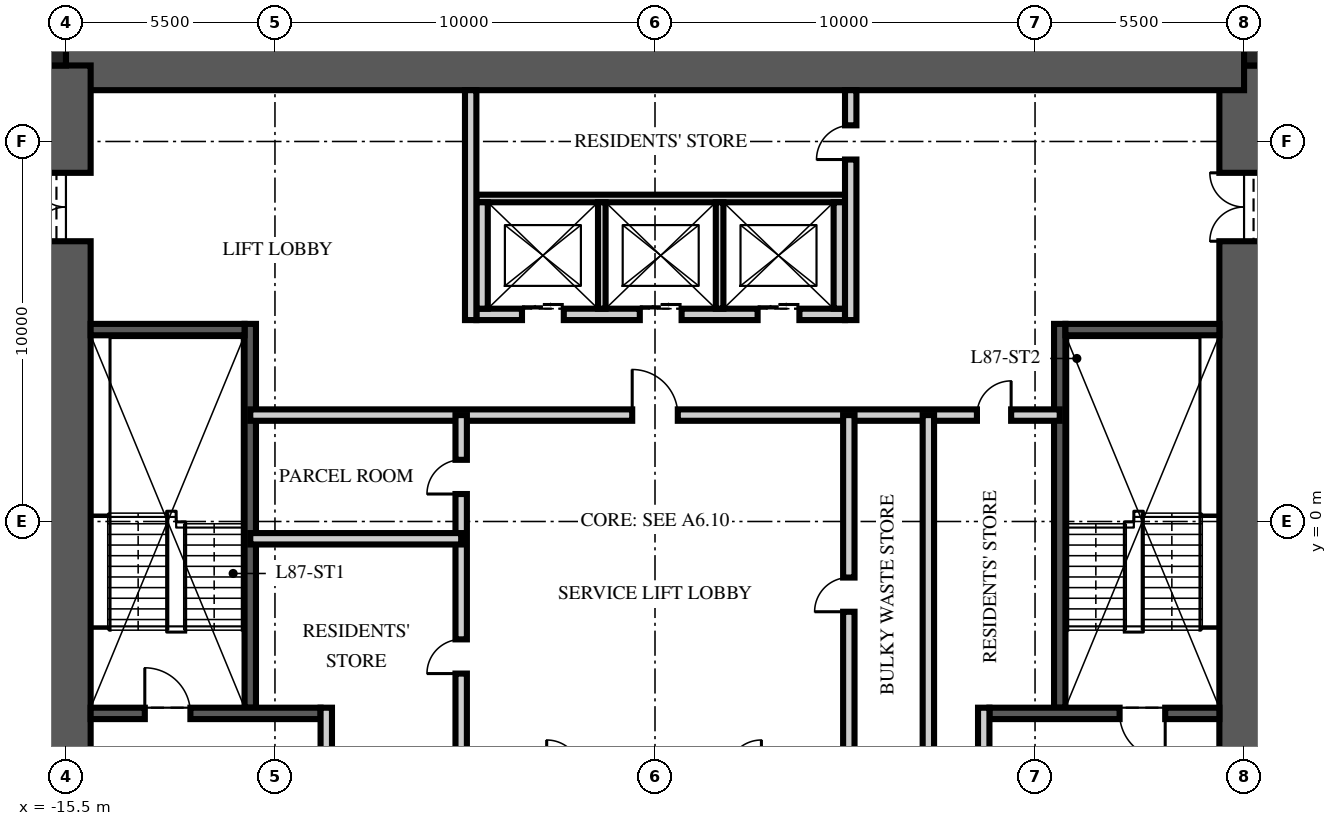
"""IFC4 building model, lengths in metres.
Left out: names, types, materials, properties, quantities, classifications, styles, units other than length and angle.
Written with IfcOpenShell. Run it as: python <this file> out.ifc"""

import sys

from ifc_helpers import new_model, si_unit, direction, frame, frame_2d, origin, origin_2d, place, context, subcontext, project, spatial, rectangle, extrude, element, fill, save


model = new_model("IFC4")
c1 = context("Model", 3, precision=1e-05, world=origin(), true_north=direction((0.0, 1.0)))
c2 = subcontext(c1, "Body", "Model", "MODEL_VIEW")
j1 = project(units=[si_unit("LENGTHUNIT", "METRE"), si_unit("PLANEANGLEUNIT", "RADIAN")], contexts=[c1])
p1 = place(None, origin())
s1 = spatial("IfcSite", under=j1, at=p1, CompositionType="ELEMENT")
p2 = place(p1, origin())
s2 = spatial("IfcBuilding", under=s1, at=p2, CompositionType="ELEMENT")
p3 = place(p2, frame((0.0, 0.0, 345.75)))
s3 = spatial("IfcBuildingStorey", under=s2, at=p3, CompositionType="ELEMENT", Elevation=345.75)
p4 = place(p3, frame((15.5, -12.0, -0.25), z_axis=(0.0, 0.0, 1.0), x_axis=(0.0, 1.0, 0.0)))
e1 = element("IfcWall", 1, at=p4, inside=s3, PredefinedType="SHEAR", context=c2, shape_type="SweptSolid", body=[
    extrude(rectangle(XDim=24.0, YDim=1.3, at=frame_2d((12.0, 0.0))), origin(), (0.0, 0.0, 1.0), 3.75),
])
p5 = place(p4, frame((3.125, 0.0, 0.25)))
e2 = element("IfcOpeningElement", 2, at=p5, cuts=e1, PredefinedType="OPENING", context=c2, shape_type="SweptSolid", body=[
    extrude(rectangle(XDim=1.2, YDim=2.1, at=frame_2d((0.6, 1.05))), frame((0.0, 0.66, 0.0), z_axis=(0.0, -1.0, 0.0), x_axis=(1.0, 0.0, 0.0)), (0.0, 0.0, 1.0), 1.32),
])
p6 = place(p4, frame((19.375, 0.0, 0.25)))
e3 = element("IfcOpeningElement", 3, at=p6, cuts=e1, PredefinedType="OPENING", context=c2, shape_type="SweptSolid", body=[
    extrude(rectangle(XDim=1.8, YDim=2.1, at=frame_2d((0.9, 1.05))), frame((0.0, 0.66, 0.0), z_axis=(0.0, -1.0, 0.0), x_axis=(1.0, 0.0, 0.0)), (0.0, 0.0, 1.0), 1.32),
])
p7 = place(p3, frame((-15.5, 12.0, -0.25), z_axis=(0.0, 0.0, 1.0), x_axis=(1.0, 0.0, 0.0)))
e4 = element("IfcWall", 4, at=p7, inside=s3, PredefinedType="SHEAR", context=c2, shape_type="SweptSolid", body=[
    extrude(rectangle(XDim=31.0, YDim=1.3, at=frame_2d((15.5, 0.0))), origin(), (0.0, 0.0, 1.0), 3.75),
])
p8 = place(p3, frame((-15.5, -12.0, -0.25), z_axis=(0.0, 0.0, 1.0), x_axis=(0.0, 1.0, 0.0)))
e5 = element("IfcWall", 5, at=p8, inside=s3, PredefinedType="SHEAR", context=c2, shape_type="SweptSolid", body=[
    extrude(rectangle(XDim=24.0, YDim=1.3, at=frame_2d((12.0, 0.0))), origin(), (0.0, 0.0, 1.0), 3.75),
])
p9 = place(p8, frame((3.125, 0.0, 0.25)))
e6 = element("IfcOpeningElement", 6, at=p9, cuts=e5, PredefinedType="OPENING", context=c2, shape_type="SweptSolid", body=[
    extrude(rectangle(XDim=1.2, YDim=2.1, at=frame_2d((0.6, 1.05))), frame((0.0, 0.66, 0.0), z_axis=(0.0, -1.0, 0.0), x_axis=(1.0, 0.0, 0.0)), (0.0, 0.0, 1.0), 1.32),
])
p10 = place(p8, frame((19.375, 0.0, 0.25)))
e7 = element("IfcOpeningElement", 7, at=p10, cuts=e5, PredefinedType="OPENING", context=c2, shape_type="SweptSolid", body=[
    extrude(rectangle(XDim=1.8, YDim=2.1, at=frame_2d((0.9, 1.05))), frame((0.0, 0.66, 0.0), z_axis=(0.0, -1.0, 0.0), x_axis=(1.0, 0.0, 0.0)), (0.0, 0.0, 1.0), 1.32),
])
for number, where, z_axis, x_axis in (
    (8, (15.825, 12.325, -0.25), (0.0, 0.0, 1.0), (1.0, 0.0, 0.0)),
    (9, (-15.825, 12.325, -0.25), (0.0, 0.0, 1.0), (1.0, 0.0, 0.0)),
):
    element("IfcColumn", number, at=place(p3, frame(where, z_axis=z_axis, x_axis=x_axis)), inside=s3, PredefinedType="COLUMN", context=c2, shape_type="SweptSolid", body=[
        extrude(rectangle(XDim=0.65, YDim=0.65, at=origin_2d()), origin(), (0.0, 0.0, 1.0), 3.75),
    ])
p11 = place(p3, frame((-10.65, -4.9, 0.0), z_axis=(0.0, 0.0, 1.0), x_axis=(0.0, 1.0, 0.0)))
e10 = element("IfcWall", 10, at=p11, inside=s3, PredefinedType="SOLIDWALL", context=c2, shape_type="SweptSolid", body=[
    extrude(rectangle(XDim=10.1, YDim=0.3, at=frame_2d((5.05, 0.0))), origin(), (0.0, 0.0, 1.0), 3.5),
])
p12 = place(p3, frame((-14.85, -5.05, 0.0), z_axis=(0.0, 0.0, 1.0), x_axis=(1.0, 0.0, 0.0)))
e11 = element("IfcWall", 11, at=p12, inside=s3, PredefinedType="SOLIDWALL", context=c2, shape_type="SweptSolid", body=[
    extrude(rectangle(XDim=6.05, YDim=0.3, at=frame_2d((3.025, 0.0))), origin(), (0.0, 0.0, 1.0), 3.5),
])
p13 = place(p12, frame((1.425, 0.0, 0.0)))
e12 = element("IfcOpeningElement", 12, at=p13, cuts=e11, PredefinedType="OPENING", context=c2, shape_type="SweptSolid", body=[
    extrude(rectangle(XDim=1.2, YDim=2.1, at=frame_2d((0.6, 1.05))), frame((0.0, 0.16, 0.0), z_axis=(0.0, -1.0, 0.0), x_axis=(1.0, 0.0, 0.0)), (0.0, 0.0, 1.0), 0.32),
])
p14 = place(p3, frame((-14.85, 5.05, 0.0), z_axis=(0.0, 0.0, 1.0), x_axis=(1.0, 0.0, 0.0)))
e13 = element("IfcWall", 13, at=p14, inside=s3, PredefinedType="SOLIDWALL", context=c2, shape_type="SweptSolid", body=[
    extrude(rectangle(XDim=4.05, YDim=0.3, at=frame_2d((2.025, 0.0))), origin(), (0.0, 0.0, 1.0), 3.5),
])
p15 = place(p3, frame((-8.65, -11.35, 0.0), z_axis=(0.0, 0.0, 1.0), x_axis=(0.0, 1.0, 0.0)))
e14 = element("IfcWall", 14, at=p15, inside=s3, PredefinedType="PARTITIONING", context=c2, shape_type="SweptSolid", body=[
    extrude(rectangle(XDim=6.45, YDim=0.3, at=frame_2d((3.225, 0.0))), origin(), (0.0, 0.0, 1.0), 3.5),
])
p16 = place(p15, frame((2.6, 0.0, 0.0)))
e15 = element("IfcOpeningElement", 15, at=p16, cuts=e14, PredefinedType="OPENING", context=c2, shape_type="SweptSolid", body=[
    extrude(rectangle(XDim=1.1, YDim=2.1, at=frame_2d((0.55, 1.05))), frame((0.0, 0.16, 0.0), z_axis=(0.0, -1.0, 0.0), x_axis=(1.0, 0.0, 0.0)), (0.0, 0.0, 1.0), 0.32),
])
p17 = place(p3, frame((10.65, -4.9, 0.0), z_axis=(0.0, 0.0, 1.0), x_axis=(0.0, 1.0, 0.0)))
e16 = element("IfcWall", 16, at=p17, inside=s3, PredefinedType="SOLIDWALL", context=c2, shape_type="SweptSolid", body=[
    extrude(rectangle(XDim=10.1, YDim=0.3, at=frame_2d((5.05, 0.0))), origin(), (0.0, 0.0, 1.0), 3.5),
])
p18 = place(p3, frame((14.85, -5.05, 0.0), z_axis=(0.0, 0.0, 1.0), x_axis=(-1.0, 0.0, 0.0)))
e17 = element("IfcWall", 17, at=p18, inside=s3, PredefinedType="SOLIDWALL", context=c2, shape_type="SweptSolid", body=[
    extrude(rectangle(XDim=6.05, YDim=0.3, at=frame_2d((3.025, 0.0))), origin(), (0.0, 0.0, 1.0), 3.5),
])
p19 = place(p18, frame((1.425, 0.0, 0.0)))
e18 = element("IfcOpeningElement", 18, at=p19, cuts=e17, PredefinedType="OPENING", context=c2, shape_type="SweptSolid", body=[
    extrude(rectangle(XDim=1.2, YDim=2.1, at=frame_2d((0.6, 1.05))), frame((0.0, 0.16, 0.0), z_axis=(0.0, -1.0, 0.0), x_axis=(1.0, 0.0, 0.0)), (0.0, 0.0, 1.0), 0.32),
])
p20 = place(p3, frame((14.85, 5.05, 0.0), z_axis=(0.0, 0.0, 1.0), x_axis=(-1.0, 0.0, 0.0)))
e19 = element("IfcWall", 19, at=p20, inside=s3, PredefinedType="SOLIDWALL", context=c2, shape_type="SweptSolid", body=[
    extrude(rectangle(XDim=4.05, YDim=0.3, at=frame_2d((2.025, 0.0))), origin(), (0.0, 0.0, 1.0), 3.5),
])
p21 = place(p3, frame((8.65, -11.35, 0.0), z_axis=(0.0, 0.0, 1.0), x_axis=(0.0, 1.0, 0.0)))
e20 = element("IfcWall", 20, at=p21, inside=s3, PredefinedType="PARTITIONING", context=c2, shape_type="SweptSolid", body=[
    extrude(rectangle(XDim=6.45, YDim=0.3, at=frame_2d((3.225, 0.0))), origin(), (0.0, 0.0, 1.0), 3.5),
])
p22 = place(p21, frame((2.6, 0.0, 0.0)))
e21 = element("IfcOpeningElement", 21, at=p22, cuts=e20, PredefinedType="OPENING", context=c2, shape_type="SweptSolid", body=[
    extrude(rectangle(XDim=1.1, YDim=2.1, at=frame_2d((0.55, 1.05))), frame((0.0, 0.16, 0.0), z_axis=(0.0, -1.0, 0.0), x_axis=(1.0, 0.0, 0.0)), (0.0, 0.0, 1.0), 0.32),
])
p23 = place(p3, frame((-4.7, 5.45, 0.0), z_axis=(0.0, 0.0, 1.0), x_axis=(1.0, 0.0, 0.0)))
e22 = element("IfcWall", 22, at=p23, inside=s3, PredefinedType="PARTITIONING", context=c2, shape_type="SweptSolid", body=[
    extrude(rectangle(XDim=9.7, YDim=0.3, at=frame_2d((4.85, 0.0))), origin(), (0.0, 0.0, 1.0), 3.5),
])
p24 = place(p23, frame((1.2, 0.0, 0.0)))
e23 = element("IfcOpeningElement", 23, at=p24, cuts=e22, PredefinedType="OPENING", context=c2, shape_type="SweptSolid", body=[
    extrude(rectangle(XDim=1.1, YDim=2.1, at=frame_2d((0.55, 1.05))), frame((0.0, 0.16, 0.0), z_axis=(0.0, -1.0, 0.0), x_axis=(1.0, 0.0, 0.0)), (0.0, 0.0, 1.0), 0.32),
])
p25 = place(p23, frame((4.3, 0.0, 0.0)))
e24 = element("IfcOpeningElement", 24, at=p25, cuts=e22, PredefinedType="OPENING", context=c2, shape_type="SweptSolid", body=[
    extrude(rectangle(XDim=1.1, YDim=2.1, at=frame_2d((0.55, 1.05))), frame((0.0, 0.16, 0.0), z_axis=(0.0, -1.0, 0.0), x_axis=(1.0, 0.0, 0.0)), (0.0, 0.0, 1.0), 0.32),
])
p26 = place(p23, frame((7.4, 0.0, 0.0)))
e25 = element("IfcOpeningElement", 25, at=p26, cuts=e22, PredefinedType="OPENING", context=c2, shape_type="SweptSolid", body=[
    extrude(rectangle(XDim=1.1, YDim=2.1, at=frame_2d((0.55, 1.05))), frame((0.0, 0.16, 0.0), z_axis=(0.0, -1.0, 0.0), x_axis=(1.0, 0.0, 0.0)), (0.0, 0.0, 1.0), 0.32),
])
p27 = place(p3, frame((-4.7, 8.5, 0.0), z_axis=(0.0, 0.0, 1.0), x_axis=(1.0, 0.0, 0.0)))
e26 = element("IfcWall", 26, at=p27, inside=s3, PredefinedType="PARTITIONING", context=c2, shape_type="SweptSolid", body=[
    extrude(rectangle(XDim=9.7, YDim=0.2, at=frame_2d((4.85, 0.0))), origin(), (0.0, 0.0, 1.0), 3.5),
])
for number, where, z_axis, x_axis in (
    (27, (-4.55, 5.6, 0.0), (0.0, 0.0, 1.0), (0.0, 1.0, 0.0)),
    (28, (4.85, 5.6, 0.0), (0.0, 0.0, 1.0), (0.0, 1.0, 0.0)),
):
    element("IfcWall", number, at=place(p3, frame(where, z_axis=z_axis, x_axis=x_axis)), inside=s3, PredefinedType="PARTITIONING", context=c2, shape_type="SweptSolid", body=[
        extrude(rectangle(XDim=2.8, YDim=0.3, at=frame_2d((1.4, 0.0))), origin(), (0.0, 0.0, 1.0), 3.5),
    ])
for number, where, z_axis, x_axis in (
    (29, (-1.4, 5.6, 0.0), (0.0, 0.0, 1.0), (0.0, 1.0, 0.0)),
    (30, (1.7, 5.6, 0.0), (0.0, 0.0, 1.0), (0.0, 1.0, 0.0)),
):
    element("IfcWall", number, at=place(p3, frame(where, z_axis=z_axis, x_axis=x_axis)), inside=s3, PredefinedType="PARTITIONING", context=c2, shape_type="SweptSolid", body=[
        extrude(rectangle(XDim=2.8, YDim=0.2, at=frame_2d((1.4, 0.0))), origin(), (0.0, 0.0, 1.0), 3.5),
    ])
p28 = place(p3, frame((-10.65, 2.8, 0.0), z_axis=(0.0, 0.0, 1.0), x_axis=(1.0, 0.0, 0.0)))
e31 = element("IfcWall", 31, at=p28, inside=s3, PredefinedType="PARTITIONING", context=c2, shape_type="SweptSolid", body=[
    extrude(rectangle(XDim=21.3, YDim=0.3, at=frame_2d((10.65, 0.0))), origin(), (0.0, 0.0, 1.0), 3.5),
])
p29 = place(p28, frame((10.05, 0.0, 0.0)))
e32 = element("IfcOpeningElement", 32, at=p29, cuts=e31, PredefinedType="OPENING", context=c2, shape_type="SweptSolid", body=[
    extrude(rectangle(XDim=1.2, YDim=2.1, at=frame_2d((0.6, 1.05))), frame((0.0, 0.16, 0.0), z_axis=(0.0, -1.0, 0.0), x_axis=(1.0, 0.0, 0.0)), (0.0, 0.0, 1.0), 0.32),
])
p30 = place(p28, frame((19.121, 0.0, 0.0)))
e33 = element("IfcOpeningElement", 33, at=p30, cuts=e31, PredefinedType="OPENING", context=c2, shape_type="SweptSolid", body=[
    extrude(rectangle(XDim=0.9, YDim=2.1, at=frame_2d((0.45, 1.05))), frame((0.0, 0.16, 0.0), z_axis=(0.0, -1.0, 0.0), x_axis=(1.0, 0.0, 0.0)), (0.0, 0.0, 1.0), 0.32),
])
p31 = place(p3, frame((-5.1, -6.65, 0.0), z_axis=(0.0, 0.0, 1.0), x_axis=(0.0, 1.0, 0.0)))
e34 = element("IfcWall", 34, at=p31, inside=s3, PredefinedType="PARTITIONING", context=c2, shape_type="SweptSolid", body=[
    extrude(rectangle(XDim=9.45, YDim=0.3, at=frame_2d((4.725, 0.0))), origin(), (0.0, 0.0, 1.0), 3.5),
])
p32 = place(p31, frame((2.648, 0.0, 0.0)))
e35 = element("IfcOpeningElement", 35, at=p32, cuts=e34, PredefinedType="OPENING", context=c2, shape_type="SweptSolid", body=[
    extrude(rectangle(XDim=0.9, YDim=2.1, at=frame_2d((0.45, 1.05))), frame((0.0, 0.16, 0.0), z_axis=(0.0, -1.0, 0.0), x_axis=(1.0, 0.0, 0.0)), (0.0, 0.0, 1.0), 0.32),
])
p33 = place(p31, frame((7.373, 0.0, 0.0)))
e36 = element("IfcOpeningElement", 36, at=p33, cuts=e34, PredefinedType="OPENING", context=c2, shape_type="SweptSolid", body=[
    extrude(rectangle(XDim=0.9, YDim=2.1, at=frame_2d((0.45, 1.05))), frame((0.0, 0.16, 0.0), z_axis=(0.0, -1.0, 0.0), x_axis=(1.0, 0.0, 0.0)), (0.0, 0.0, 1.0), 0.32),
])
p34 = place(p3, frame((5.1, -6.65, 0.0), z_axis=(0.0, 0.0, 1.0), x_axis=(0.0, 1.0, 0.0)))
e37 = element("IfcWall", 37, at=p34, inside=s3, PredefinedType="PARTITIONING", context=c2, shape_type="SweptSolid", body=[
    extrude(rectangle(XDim=9.45, YDim=0.3, at=frame_2d((4.725, 0.0))), origin(), (0.0, 0.0, 1.0), 3.5),
])
p35 = place(p34, frame((4.275, 0.0, 0.0)))
e38 = element("IfcOpeningElement", 38, at=p35, cuts=e37, PredefinedType="OPENING", context=c2, shape_type="SweptSolid", body=[
    extrude(rectangle(XDim=0.9, YDim=2.1, at=frame_2d((0.45, 1.05))), frame((0.0, 0.16, 0.0), z_axis=(0.0, -1.0, 0.0), x_axis=(1.0, 0.0, 0.0)), (0.0, 0.0, 1.0), 0.32),
])
p36 = place(p3, frame((-10.65, -0.455, 0.0), z_axis=(0.0, 0.0, 1.0), x_axis=(1.0, 0.0, 0.0)))
e39 = element("IfcWall", 39, at=p36, inside=s3, PredefinedType="PARTITIONING", context=c2, shape_type="SweptSolid", body=[
    extrude(rectangle(XDim=5.55, YDim=0.3, at=frame_2d((2.775, 0.0))), origin(), (0.0, 0.0, 1.0), 3.5),
])
p37 = place(p3, frame((7.193, -6.65, 0.0), z_axis=(0.0, 0.0, 1.0), x_axis=(0.0, 1.0, 0.0)))
e40 = element("IfcWall", 40, at=p37, inside=s3, PredefinedType="PARTITIONING", context=c2, shape_type="SweptSolid", body=[
    extrude(rectangle(XDim=9.45, YDim=0.3, at=frame_2d((4.725, 0.0))), origin(), (0.0, 0.0, 1.0), 3.5),
])
p38 = place(p3, frame((-4.85, 5.3, 0.0), z_axis=(0.0, 0.0, 1.0), x_axis=(0.0, 1.0, 0.0)))
e41 = element("IfcWall", 41, at=p38, inside=s3, PredefinedType="PARTITIONING", context=c2, shape_type="SweptSolid", body=[
    extrude(rectangle(XDim=6.05, YDim=0.3, at=frame_2d((3.025, 0.0))), origin(), (0.0, 0.0, 1.0), 3.5),
])
p39 = place(p3, frame((5.15, 5.3, 0.0), z_axis=(0.0, 0.0, 1.0), x_axis=(0.0, 1.0, 0.0)))
e42 = element("IfcWall", 42, at=p39, inside=s3, PredefinedType="PARTITIONING", context=c2, shape_type="SweptSolid", body=[
    extrude(rectangle(XDim=6.05, YDim=0.3, at=frame_2d((3.025, 0.0))), origin(), (0.0, 0.0, 1.0), 3.5),
])
p40 = place(p39, frame((4.225, 0.0, 0.0)))
e43 = element("IfcOpeningElement", 43, at=p40, cuts=e42, PredefinedType="OPENING", context=c2, shape_type="SweptSolid", body=[
    extrude(rectangle(XDim=0.9, YDim=2.1, at=frame_2d((0.45, 1.05))), frame((0.0, 0.16, 0.0), z_axis=(0.0, -1.0, 0.0), x_axis=(1.0, 0.0, 0.0)), (0.0, 0.0, 1.0), 0.32),
])
p41 = place(p13, origin())
e44 = element("IfcDoor", 44, at=p41, inside=s3, OperationType="SINGLE_SWING_LEFT", PredefinedType="DOOR", context=c2, shape_type="SweptSolid", body=[
    extrude(rectangle(XDim=1.2, YDim=2.1, at=frame_2d((0.6, 1.05))), frame((0.0, 0.025, 0.0), z_axis=(0.0, -1.0, 0.0), x_axis=(1.0, 0.0, 0.0)), (0.0, 0.0, 1.0), 0.05),
])
fill(e12, e44)
p42 = place(p10, origin())
e45 = element("IfcDoor", 45, at=p42, inside=s3, OperationType="DOUBLE_DOOR_SINGLE_SWING", PredefinedType="DOOR", context=c2, shape_type="SweptSolid", body=[
    extrude(rectangle(XDim=1.8, YDim=2.1, at=frame_2d((0.9, 1.05))), frame((0.0, 0.025, 0.0), z_axis=(0.0, -1.0, 0.0), x_axis=(1.0, 0.0, 0.0)), (0.0, 0.0, 1.0), 0.05),
])
fill(e7, e45)
p43 = place(p19, origin())
e46 = element("IfcDoor", 46, at=p43, inside=s3, OperationType="SINGLE_SWING_LEFT", PredefinedType="DOOR", context=c2, shape_type="SweptSolid", body=[
    extrude(rectangle(XDim=1.2, YDim=2.1, at=frame_2d((0.6, 1.05))), frame((0.0, 0.025, 0.0), z_axis=(0.0, -1.0, 0.0), x_axis=(1.0, 0.0, 0.0)), (0.0, 0.0, 1.0), 0.05),
])
fill(e18, e46)
p44 = place(p6, origin())
e47 = element("IfcDoor", 47, at=p44, inside=s3, OperationType="DOUBLE_DOOR_SINGLE_SWING", PredefinedType="DOOR", context=c2, shape_type="SweptSolid", body=[
    extrude(rectangle(XDim=1.8, YDim=2.1, at=frame_2d((0.9, 1.05))), frame((0.0, 0.025, 0.0), z_axis=(0.0, -1.0, 0.0), x_axis=(1.0, 0.0, 0.0)), (0.0, 0.0, 1.0), 0.05),
])
fill(e3, e47)
p45 = place(p24, origin())
e48 = element("IfcDoor", 48, at=p45, inside=s3, OperationType="DOUBLE_DOOR_SLIDING", PredefinedType="DOOR", context=c2, shape_type="SweptSolid", body=[
    extrude(rectangle(XDim=1.1, YDim=2.1, at=frame_2d((0.55, 1.05))), frame((0.0, 0.025, 0.0), z_axis=(0.0, -1.0, 0.0), x_axis=(1.0, 0.0, 0.0)), (0.0, 0.0, 1.0), 0.05),
])
fill(e23, e48)
p46 = place(p25, origin())
e49 = element("IfcDoor", 49, at=p46, inside=s3, OperationType="DOUBLE_DOOR_SLIDING", PredefinedType="DOOR", context=c2, shape_type="SweptSolid", body=[
    extrude(rectangle(XDim=1.1, YDim=2.1, at=frame_2d((0.55, 1.05))), frame((0.0, 0.025, 0.0), z_axis=(0.0, -1.0, 0.0), x_axis=(1.0, 0.0, 0.0)), (0.0, 0.0, 1.0), 0.05),
])
fill(e24, e49)
p47 = place(p26, origin())
e50 = element("IfcDoor", 50, at=p47, inside=s3, OperationType="DOUBLE_DOOR_SLIDING", PredefinedType="DOOR", context=c2, shape_type="SweptSolid", body=[
    extrude(rectangle(XDim=1.1, YDim=2.1, at=frame_2d((0.55, 1.05))), frame((0.0, 0.025, 0.0), z_axis=(0.0, -1.0, 0.0), x_axis=(1.0, 0.0, 0.0)), (0.0, 0.0, 1.0), 0.05),
])
fill(e25, e50)
p48 = place(p29, origin())
e51 = element("IfcDoor", 51, at=p48, inside=s3, OperationType="SINGLE_SWING_LEFT", PredefinedType="DOOR", context=c2, shape_type="SweptSolid", body=[
    extrude(rectangle(XDim=1.2, YDim=2.1, at=frame_2d((0.6, 1.05))), frame((0.0, 0.025, 0.0), z_axis=(0.0, -1.0, 0.0), x_axis=(1.0, 0.0, 0.0)), (0.0, 0.0, 1.0), 0.05),
])
fill(e32, e51)
p49 = place(p32, origin())
e52 = element("IfcDoor", 52, at=p49, inside=s3, OperationType="SINGLE_SWING_LEFT", PredefinedType="DOOR", context=c2, shape_type="SweptSolid", body=[
    extrude(rectangle(XDim=0.9, YDim=2.1, at=frame_2d((0.45, 1.05))), frame((0.0, 0.025, 0.0), z_axis=(0.0, -1.0, 0.0), x_axis=(1.0, 0.0, 0.0)), (0.0, 0.0, 1.0), 0.05),
])
fill(e35, e52)
p50 = place(p33, origin())
e53 = element("IfcDoor", 53, at=p50, inside=s3, OperationType="SINGLE_SWING_LEFT", PredefinedType="DOOR", context=c2, shape_type="SweptSolid", body=[
    extrude(rectangle(XDim=0.9, YDim=2.1, at=frame_2d((0.45, 1.05))), frame((0.0, 0.025, 0.0), z_axis=(0.0, -1.0, 0.0), x_axis=(1.0, 0.0, 0.0)), (0.0, 0.0, 1.0), 0.05),
])
fill(e36, e53)
p51 = place(p35, origin())
e54 = element("IfcDoor", 54, at=p51, inside=s3, OperationType="SINGLE_SWING_LEFT", PredefinedType="DOOR", context=c2, shape_type="SweptSolid", body=[
    extrude(rectangle(XDim=0.9, YDim=2.1, at=frame_2d((0.45, 1.05))), frame((0.0, 0.025, 0.0), z_axis=(0.0, -1.0, 0.0), x_axis=(1.0, 0.0, 0.0)), (0.0, 0.0, 1.0), 0.05),
])
fill(e38, e54)
p52 = place(p30, origin())
e55 = element("IfcDoor", 55, at=p52, inside=s3, OperationType="SINGLE_SWING_RIGHT", PredefinedType="DOOR", context=c2, shape_type="SweptSolid", body=[
    extrude(rectangle(XDim=0.9, YDim=2.1, at=frame_2d((0.45, 1.05))), frame((0.0, 0.025, 0.0), z_axis=(0.0, -1.0, 0.0), x_axis=(1.0, 0.0, 0.0)), (0.0, 0.0, 1.0), 0.05),
])
fill(e33, e55)
p53 = place(p40, origin())
e56 = element("IfcDoor", 56, at=p53, inside=s3, OperationType="SINGLE_SWING_LEFT", PredefinedType="DOOR", context=c2, shape_type="SweptSolid", body=[
    extrude(rectangle(XDim=0.9, YDim=2.1, at=frame_2d((0.45, 1.05))), frame((0.0, 0.025, 0.0), z_axis=(0.0, -1.0, 0.0), x_axis=(1.0, 0.0, 0.0)), (0.0, 0.0, 1.0), 0.05),
])
fill(e43, e56)
save(model, sys.argv[1])
